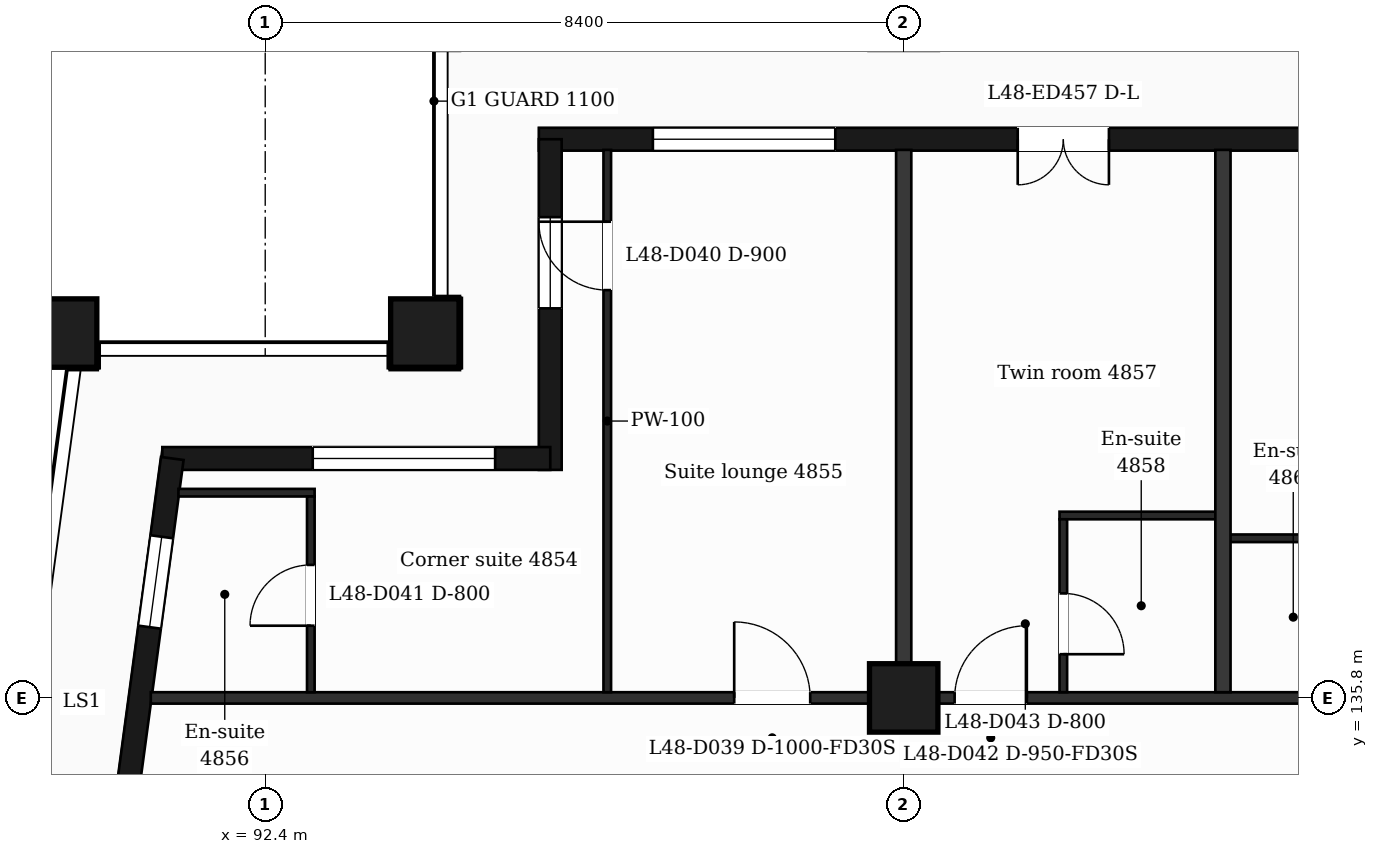
"""IFC4 building model, lengths in metres.
Left out: names, types, materials, properties, quantities, classifications, styles, units other than length and angle.
Written with IfcOpenShell. Run it as: python <this file> out.ifc"""

import sys

from ifc_helpers import new_model, si_unit, direction, frame, frame_2d, origin, origin_2d, place, context, subcontext, project, spatial, rectangle, extrude, element, fill, save


model = new_model("IFC4")
c1 = context("Model", 3, precision=1e-05, world=origin(), true_north=direction((0.0, 1.0)))
c2 = subcontext(c1, "Body", "Model", "MODEL_VIEW")
j1 = project(units=[si_unit("LENGTHUNIT", "METRE"), si_unit("PLANEANGLEUNIT", "RADIAN")], contexts=[c1])
p1 = place(None, origin())
s1 = spatial("IfcSite", under=j1, at=p1, CompositionType="ELEMENT")
p2 = place(p1, origin())
s2 = spatial("IfcBuilding", under=s1, at=p2, CompositionType="ELEMENT")
p3 = place(p2, frame((0.0, 0.0, 202.2)))
s3 = spatial("IfcBuildingStorey", under=s2, at=p3, CompositionType="ELEMENT", Elevation=202.2)
for number, where, z_axis, x_axis in (
    (1, (94.5, 140.6, 0.0), (0.0, 0.0, 1.0), (1.0, 0.0, 0.0)),
    (2, (89.735, 140.6, 0.0), (0.0, 0.0, 1.0), (1.0, 0.0, 0.0)),
    (3, (100.8, 135.8, 0.0), (0.0, 0.0, 1.0), (1.0, 0.0, 0.0)),
):
    element("IfcColumn", number, at=place(p3, frame(where, z_axis=z_axis, x_axis=x_axis)), inside=s3, PredefinedType="COLUMN", context=c2, shape_type="SweptSolid", body=[
        extrude(rectangle(XDim=0.9, YDim=0.9, at=origin_2d()), origin(), (0.0, 0.0, 1.0), 3.7),
    ])
p4 = place(p3, frame((110.4, 143.15, 0.0), z_axis=(0.0, 0.0, 1.0), x_axis=(-1.0, 0.0, 0.0)))
e4 = element("IfcWall", 4, at=p4, inside=s3, PredefinedType="SOLIDWALL", context=c2, shape_type="SweptSolid", body=[
    extrude(rectangle(XDim=14.4, YDim=0.3, at=frame_2d((7.2, 0.0))), origin(), (0.0, 0.0, 1.0), 3.38),
])
p5 = place(p4, frame((2.7, 0.0, 0.9)))
e5 = element("IfcOpeningElement", 5, at=p5, cuts=e4, PredefinedType="OPENING", context=c2, shape_type="SweptSolid", body=[
    extrude(rectangle(XDim=1.2, YDim=2.1, at=frame_2d((0.6, 1.05))), frame((0.0, 0.16, 0.0), z_axis=(0.0, -1.0, 0.0), x_axis=(1.0, 0.0, 0.0)), (0.0, 0.0, 1.0), 0.32),
])
p6 = place(p4, frame((6.9, 0.0, 0.0)))
e6 = element("IfcOpeningElement", 6, at=p6, cuts=e4, PredefinedType="OPENING", context=c2, shape_type="SweptSolid", body=[
    extrude(rectangle(XDim=1.2, YDim=2.4, at=frame_2d((0.6, 1.2))), frame((0.0, 0.16, 0.0), z_axis=(0.0, -1.0, 0.0), x_axis=(1.0, 0.0, 0.0)), (0.0, 0.0, 1.0), 0.32),
])
p7 = place(p4, frame((10.5, 0.0, 0.9)))
e7 = element("IfcOpeningElement", 7, at=p7, cuts=e4, PredefinedType="OPENING", context=c2, shape_type="SweptSolid", body=[
    extrude(rectangle(XDim=2.4, YDim=2.1, at=frame_2d((1.2, 1.05))), frame((0.0, 0.16, 0.0), z_axis=(0.0, -1.0, 0.0), x_axis=(1.0, 0.0, 0.0)), (0.0, 0.0, 1.0), 0.32),
])
p8 = place(p3, frame((96.15, 143.15, 0.0), z_axis=(0.0, 0.0, 1.0), x_axis=(0.0, -1.0, 0.0)))
e8 = element("IfcWall", 8, at=p8, inside=s3, PredefinedType="SOLIDWALL", context=c2, shape_type="SweptSolid", body=[
    extrude(rectangle(XDim=4.35, YDim=0.3, at=frame_2d((2.175, 0.0))), origin(), (0.0, 0.0, 1.0), 3.38),
])
p9 = place(p8, frame((1.025, 0.0, 0.9)))
e9 = element("IfcOpeningElement", 9, at=p9, cuts=e8, PredefinedType="OPENING", context=c2, shape_type="SweptSolid", body=[
    extrude(rectangle(XDim=1.2, YDim=2.1, at=frame_2d((0.6, 1.05))), frame((0.0, 0.16, 0.0), z_axis=(0.0, -1.0, 0.0), x_axis=(1.0, 0.0, 0.0)), (0.0, 0.0, 1.0), 0.32),
])
p10 = place(p3, frame((96.15, 138.95, 0.0), z_axis=(0.0, 0.0, 1.0), x_axis=(-1.0, 0.0, 0.0)))
e10 = element("IfcWall", 10, at=p10, inside=s3, PredefinedType="SOLIDWALL", context=c2, shape_type="SweptSolid", body=[
    extrude(rectangle(XDim=5.104, YDim=0.3, at=frame_2d((2.552, 0.0))), origin(), (0.0, 0.0, 1.0), 3.38),
])
p11 = place(p10, frame((0.725, 0.0, 0.9)))
e11 = element("IfcOpeningElement", 11, at=p11, cuts=e10, PredefinedType="OPENING", context=c2, shape_type="SweptSolid", body=[
    extrude(rectangle(XDim=2.4, YDim=2.1, at=frame_2d((1.2, 1.05))), frame((0.0, 0.16, 0.0), z_axis=(0.0, -1.0, 0.0), x_axis=(1.0, 0.0, 0.0)), (0.0, 0.0, 1.0), 0.32),
])
p12 = place(p3, frame((91.177, 138.95, 0.0), z_axis=(0.0, 0.0, 1.0), x_axis=(-0.133426664613, -0.991058689065, 0.0)))
e12 = element("IfcWall", 12, at=p12, inside=s3, PredefinedType="SOLIDWALL", context=c2, shape_type="SweptSolid", body=[
    extrude(rectangle(XDim=6.609, YDim=0.3, at=frame_2d((3.305, 0.0))), origin(), (0.0, 0.0, 1.0), 3.38),
])
p13 = place(p12, frame((1.039, 0.0, 0.9)))
e13 = element("IfcOpeningElement", 13, at=p13, cuts=e12, PredefinedType="OPENING", context=c2, shape_type="SweptSolid", body=[
    extrude(rectangle(XDim=1.2, YDim=2.1, at=frame_2d((0.6, 1.05))), frame((0.0, 0.16, 0.0), z_axis=(0.0, -1.0, 0.0), x_axis=(1.0, 0.0, 0.0)), (0.0, 0.0, 1.0), 0.32),
])
p14 = place(p12, frame((4.294, 0.0, 0.0)))
e14 = element("IfcOpeningElement", 14, at=p14, cuts=e12, PredefinedType="OPENING", context=c2, shape_type="SweptSolid", body=[
    extrude(rectangle(XDim=1.2, YDim=2.4, at=frame_2d((0.6, 1.2))), frame((0.0, 0.16, 0.0), z_axis=(0.0, -1.0, 0.0), x_axis=(1.0, 0.0, 0.0)), (0.0, 0.0, 1.0), 0.32),
])
p15 = place(p3, frame((90.895, 135.8, 0.0), z_axis=(0.0, 0.0, 1.0), x_axis=(1.0, 0.0, 0.0)))
e15 = element("IfcWall", 15, at=p15, inside=s3, PredefinedType="PARTITIONING", context=c2, shape_type="SweptSolid", body=[
    extrude(rectangle(XDim=45.011, YDim=0.15, at=frame_2d((22.505, 0.0))), origin(), (0.0, 0.0, 1.0), 3.38),
])
p16 = place(p15, frame((7.675, 0.0, 0.0)))
e16 = element("IfcOpeningElement", 16, at=p16, cuts=e15, PredefinedType="OPENING", context=c2, shape_type="SweptSolid", body=[
    extrude(rectangle(XDim=1.0, YDim=2.1, at=frame_2d((0.5, 1.05))), frame((0.0, 0.085, 0.0), z_axis=(0.0, -1.0, 0.0), x_axis=(1.0, 0.0, 0.0)), (0.0, 0.0, 1.0), 0.17),
])
p17 = place(p15, frame((10.575, 0.0, 0.0)))
e17 = element("IfcOpeningElement", 17, at=p17, cuts=e15, PredefinedType="OPENING", context=c2, shape_type="SweptSolid", body=[
    extrude(rectangle(XDim=0.95, YDim=2.1, at=frame_2d((0.475, 1.05))), frame((0.0, 0.085, 0.0), z_axis=(0.0, -1.0, 0.0), x_axis=(1.0, 0.0, 0.0)), (0.0, 0.0, 1.0), 0.17),
])
p18 = place(p15, frame((18.979, 0.0, 0.0)))
e18 = element("IfcOpeningElement", 18, at=p18, cuts=e15, PredefinedType="OPENING", context=c2, shape_type="SweptSolid", body=[
    extrude(rectangle(XDim=0.95, YDim=2.1, at=frame_2d((0.475, 1.05))), frame((0.0, 0.085, 0.0), z_axis=(0.0, -1.0, 0.0), x_axis=(1.0, 0.0, 0.0)), (0.0, 0.0, 1.0), 0.17),
])
p19 = place(p15, frame((23.035, 0.0, 0.0)))
e19 = element("IfcOpeningElement", 19, at=p19, cuts=e15, PredefinedType="OPENING", context=c2, shape_type="SweptSolid", body=[
    extrude(rectangle(XDim=0.95, YDim=2.1, at=frame_2d((0.475, 1.05))), frame((0.0, 0.085, 0.0), z_axis=(0.0, -1.0, 0.0), x_axis=(1.0, 0.0, 0.0)), (0.0, 0.0, 1.0), 0.17),
])
p20 = place(p15, frame((29.23, 0.0, 0.0)))
e20 = element("IfcOpeningElement", 20, at=p20, cuts=e15, PredefinedType="OPENING", context=c2, shape_type="SweptSolid", body=[
    extrude(rectangle(XDim=0.95, YDim=2.1, at=frame_2d((0.475, 1.05))), frame((0.0, 0.085, 0.0), z_axis=(0.0, -1.0, 0.0), x_axis=(1.0, 0.0, 0.0)), (0.0, 0.0, 1.0), 0.17),
])
p21 = place(p15, frame((31.367, 0.0, 0.0)))
e21 = element("IfcOpeningElement", 21, at=p21, cuts=e15, PredefinedType="OPENING", context=c2, shape_type="SweptSolid", body=[
    extrude(rectangle(XDim=0.95, YDim=2.1, at=frame_2d((0.475, 1.05))), frame((0.0, 0.085, 0.0), z_axis=(0.0, -1.0, 0.0), x_axis=(1.0, 0.0, 0.0)), (0.0, 0.0, 1.0), 0.17),
])
p22 = place(p15, frame((39.814, 0.0, 0.0)))
e22 = element("IfcOpeningElement", 22, at=p22, cuts=e15, PredefinedType="OPENING", context=c2, shape_type="SweptSolid", body=[
    extrude(rectangle(XDim=0.95, YDim=2.1, at=frame_2d((0.475, 1.05))), frame((0.0, 0.085, 0.0), z_axis=(0.0, -1.0, 0.0), x_axis=(1.0, 0.0, 0.0)), (0.0, 0.0, 1.0), 0.17),
])
p23 = place(p3, frame((105.0, 137.9, 0.0), z_axis=(0.0, 0.0, 1.0), x_axis=(1.0, 0.0, 0.0)))
e23 = element("IfcWall", 23, at=p23, inside=s3, PredefinedType="PARTITIONING", context=c2, shape_type="SweptSolid", body=[
    extrude(rectangle(XDim=1.85, YDim=0.1, at=frame_2d((0.925, 0.0))), origin(), (0.0, 0.0, 1.0), 3.38),
])
p24 = place(p3, frame((102.85, 138.2, 0.0), z_axis=(0.0, 0.0, 1.0), x_axis=(1.0, 0.0, 0.0)))
e24 = element("IfcWall", 24, at=p24, inside=s3, PredefinedType="PARTITIONING", context=c2, shape_type="SweptSolid", body=[
    extrude(rectangle(XDim=2.15, YDim=0.1, at=frame_2d((1.075, 0.0))), origin(), (0.0, 0.0, 1.0), 3.38),
])
p25 = place(p3, frame((91.258, 138.5, 0.0), z_axis=(0.0, 0.0, 1.0), x_axis=(1.0, 0.0, 0.0)))
e25 = element("IfcWall", 25, at=p25, inside=s3, PredefinedType="PARTITIONING", context=c2, shape_type="SweptSolid", body=[
    extrude(rectangle(XDim=1.792, YDim=0.1, at=frame_2d((0.896, 0.0))), origin(), (0.0, 0.0, 1.0), 3.38),
])
p26 = place(p3, frame((93.0, 135.875, 0.0), z_axis=(0.0, 0.0, 1.0), x_axis=(0.0, 1.0, 0.0)))
e26 = element("IfcWall", 26, at=p26, inside=s3, PredefinedType="PARTITIONING", context=c2, shape_type="SweptSolid", body=[
    extrude(rectangle(XDim=2.575, YDim=0.1, at=frame_2d((1.288, 0.0))), origin(), (0.0, 0.0, 1.0), 3.38),
])
p27 = place(p26, frame((0.875, 0.0, 0.0)))
e27 = element("IfcOpeningElement", 27, at=p27, cuts=e26, PredefinedType="OPENING", context=c2, shape_type="SweptSolid", body=[
    extrude(rectangle(XDim=0.8, YDim=2.1, at=frame_2d((0.4, 1.05))), frame((0.0, 0.06, 0.0), z_axis=(0.0, -1.0, 0.0), x_axis=(1.0, 0.0, 0.0)), (0.0, 0.0, 1.0), 0.12),
])
p28 = place(p3, frame((96.9, 135.875, 0.0), z_axis=(0.0, 0.0, 1.0), x_axis=(0.0, 1.0, 0.0)))
e28 = element("IfcWall", 28, at=p28, inside=s3, PredefinedType="PARTITIONING", context=c2, shape_type="SweptSolid", body=[
    extrude(rectangle(XDim=7.135, YDim=0.1, at=frame_2d((3.567, 0.0))), origin(), (0.0, 0.0, 1.0), 3.38),
])
p29 = place(p28, frame((5.29, 0.0, 0.0)))
e29 = element("IfcOpeningElement", 29, at=p29, cuts=e28, PredefinedType="OPENING", context=c2, shape_type="SweptSolid", body=[
    extrude(rectangle(XDim=0.9, YDim=2.1, at=frame_2d((0.45, 1.05))), frame((0.0, 0.06, 0.0), z_axis=(0.0, -1.0, 0.0), x_axis=(1.0, 0.0, 0.0)), (0.0, 0.0, 1.0), 0.12),
])
p30 = place(p3, frame((100.8, 135.875, 0.0), z_axis=(0.0, 0.0, 1.0), x_axis=(0.0, 1.0, 0.0)))
e30 = element("IfcWall", 30, at=p30, inside=s3, PredefinedType="PARTITIONING", context=c2, shape_type="SweptSolid", body=[
    extrude(rectangle(XDim=7.135, YDim=0.2, at=frame_2d((3.567, 0.0))), origin(), (0.0, 0.0, 1.0), 3.38),
])
p31 = place(p3, frame((102.9, 135.875, 0.0), z_axis=(0.0, 0.0, 1.0), x_axis=(0.0, 1.0, 0.0)))
e31 = element("IfcWall", 31, at=p31, inside=s3, PredefinedType="PARTITIONING", context=c2, shape_type="SweptSolid", body=[
    extrude(rectangle(XDim=2.275, YDim=0.1, at=frame_2d((1.137, 0.0))), origin(), (0.0, 0.0, 1.0), 3.38),
])
p32 = place(p31, frame((0.5, 0.0, 0.0)))
e32 = element("IfcOpeningElement", 32, at=p32, cuts=e31, PredefinedType="OPENING", context=c2, shape_type="SweptSolid", body=[
    extrude(rectangle(XDim=0.8, YDim=2.1, at=frame_2d((0.4, 1.05))), frame((0.0, 0.06, 0.0), z_axis=(0.0, -1.0, 0.0), x_axis=(1.0, 0.0, 0.0)), (0.0, 0.0, 1.0), 0.12),
])
p33 = place(p3, frame((105.0, 135.875, 0.0), z_axis=(0.0, 0.0, 1.0), x_axis=(0.0, 1.0, 0.0)))
e33 = element("IfcWall", 33, at=p33, inside=s3, PredefinedType="PARTITIONING", context=c2, shape_type="SweptSolid", body=[
    extrude(rectangle(XDim=7.135, YDim=0.2, at=frame_2d((3.567, 0.0))), origin(), (0.0, 0.0, 1.0), 3.38),
])
p34 = place(p6, origin())
e34 = element("IfcDoor", 34, at=p34, inside=s3, OperationType="DOUBLE_DOOR_SINGLE_SWING", PredefinedType="DOOR", context=c2, shape_type="SweptSolid", body=[
    extrude(rectangle(XDim=1.2, YDim=2.4, at=frame_2d((0.6, 1.2))), frame((0.0, 0.025, 0.0), z_axis=(0.0, -1.0, 0.0), x_axis=(1.0, 0.0, 0.0)), (0.0, 0.0, 1.0), 0.05),
])
fill(e6, e34)
p35 = place(p7, origin())
e35 = element("IfcWindow", 35, at=p35, inside=s3, PartitioningType="SINGLE_PANEL", PredefinedType="WINDOW", context=c2, shape_type="SweptSolid", body=[
    extrude(rectangle(XDim=2.4, YDim=2.1, at=frame_2d((1.2, 1.05))), frame((0.0, 0.03, 0.0), z_axis=(0.0, -1.0, 0.0), x_axis=(1.0, 0.0, 0.0)), (0.0, 0.0, 1.0), 0.06),
])
fill(e7, e35)
p36 = place(p9, origin())
e36 = element("IfcWindow", 36, at=p36, inside=s3, PartitioningType="SINGLE_PANEL", PredefinedType="WINDOW", context=c2, shape_type="SweptSolid", body=[
    extrude(rectangle(XDim=1.2, YDim=2.1, at=frame_2d((0.6, 1.05))), frame((0.0, 0.03, 0.0), z_axis=(0.0, -1.0, 0.0), x_axis=(1.0, 0.0, 0.0)), (0.0, 0.0, 1.0), 0.06),
])
fill(e9, e36)
p37 = place(p11, origin())
e37 = element("IfcWindow", 37, at=p37, inside=s3, PartitioningType="SINGLE_PANEL", PredefinedType="WINDOW", context=c2, shape_type="SweptSolid", body=[
    extrude(rectangle(XDim=2.4, YDim=2.1, at=frame_2d((1.2, 1.05))), frame((0.0, 0.03, 0.0), z_axis=(0.0, -1.0, 0.0), x_axis=(1.0, 0.0, 0.0)), (0.0, 0.0, 1.0), 0.06),
])
fill(e11, e37)
p38 = place(p13, origin())
e38 = element("IfcWindow", 38, at=p38, inside=s3, PartitioningType="SINGLE_PANEL", PredefinedType="WINDOW", context=c2, shape_type="SweptSolid", body=[
    extrude(rectangle(XDim=1.2, YDim=2.1, at=frame_2d((0.6, 1.05))), frame((0.0, 0.03, 0.0), z_axis=(0.0, -1.0, 0.0), x_axis=(1.0, 0.0, 0.0)), (0.0, 0.0, 1.0), 0.06),
])
fill(e13, e38)
p39 = place(p16, origin())
e39 = element("IfcDoor", 39, at=p39, inside=s3, OperationType="SINGLE_SWING_LEFT", PredefinedType="DOOR", context=c2, shape_type="SweptSolid", body=[
    extrude(rectangle(XDim=1.0, YDim=2.1, at=frame_2d((0.5, 1.05))), frame((0.0, 0.025, 0.0), z_axis=(0.0, -1.0, 0.0), x_axis=(1.0, 0.0, 0.0)), (0.0, 0.0, 1.0), 0.05),
])
fill(e16, e39)
p40 = place(p29, origin())
e40 = element("IfcDoor", 40, at=p40, inside=s3, OperationType="SINGLE_SWING_RIGHT", PredefinedType="DOOR", context=c2, shape_type="SweptSolid", body=[
    extrude(rectangle(XDim=0.9, YDim=2.1, at=frame_2d((0.45, 1.05))), frame((0.0, 0.025, 0.0), z_axis=(0.0, -1.0, 0.0), x_axis=(1.0, 0.0, 0.0)), (0.0, 0.0, 1.0), 0.05),
])
fill(e29, e40)
p41 = place(p27, origin())
e41 = element("IfcDoor", 41, at=p41, inside=s3, OperationType="SINGLE_SWING_LEFT", PredefinedType="DOOR", context=c2, shape_type="SweptSolid", body=[
    extrude(rectangle(XDim=0.8, YDim=2.1, at=frame_2d((0.4, 1.05))), frame((0.0, 0.025, 0.0), z_axis=(0.0, -1.0, 0.0), x_axis=(1.0, 0.0, 0.0)), (0.0, 0.0, 1.0), 0.05),
])
fill(e27, e41)
p42 = place(p17, origin())
e42 = element("IfcDoor", 42, at=p42, inside=s3, OperationType="SINGLE_SWING_RIGHT", PredefinedType="DOOR", context=c2, shape_type="SweptSolid", body=[
    extrude(rectangle(XDim=0.95, YDim=2.1, at=frame_2d((0.475, 1.05))), frame((0.0, 0.025, 0.0), z_axis=(0.0, -1.0, 0.0), x_axis=(1.0, 0.0, 0.0)), (0.0, 0.0, 1.0), 0.05),
])
fill(e17, e42)
p43 = place(p32, origin())
e43 = element("IfcDoor", 43, at=p43, inside=s3, OperationType="SINGLE_SWING_LEFT", PredefinedType="DOOR", context=c2, shape_type="SweptSolid", body=[
    extrude(rectangle(XDim=0.8, YDim=2.1, at=frame_2d((0.4, 1.05))), frame((0.0, 0.025, 0.0), z_axis=(0.0, -1.0, 0.0), x_axis=(1.0, 0.0, 0.0)), (0.0, 0.0, 1.0), 0.05),
])
fill(e32, e43)
save(model, sys.argv[1])
